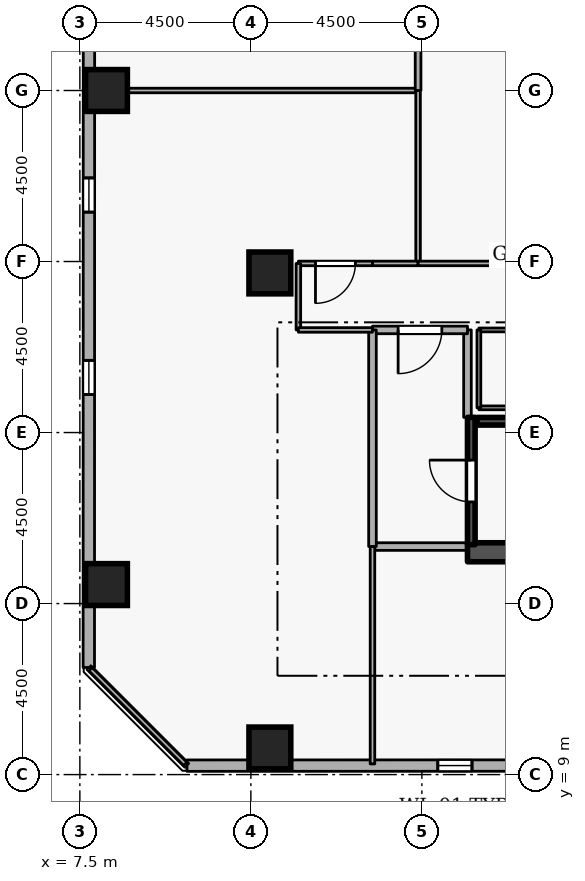
"""IFC4 building model, lengths in metres.
Left out: names, types, materials, properties, quantities, classifications, styles, units other than length and angle.
Written with IfcOpenShell. Run it as: python <this file> out.ifc"""

import sys

from ifc_helpers import new_model, si_unit, direction, frame, frame_2d, origin, origin_2d, place, context, subcontext, project, spatial, rectangle, extrude, element, fill, save


model = new_model("IFC4")
c1 = context("Model", 3, precision=1e-05, world=origin(), true_north=direction((0.0, 1.0)))
c2 = subcontext(c1, "Body", "Model", "MODEL_VIEW")
j1 = project(units=[si_unit("LENGTHUNIT", "METRE"), si_unit("PLANEANGLEUNIT", "RADIAN")], contexts=[c1])
p1 = place(None, origin())
s1 = spatial("IfcSite", under=j1, at=p1, CompositionType="ELEMENT")
p2 = place(p1, origin())
s2 = spatial("IfcBuilding", under=s1, at=p2, CompositionType="ELEMENT")
p3 = place(p2, frame((0.0, 0.0, 189.3)))
s3 = spatial("IfcBuildingStorey", under=s2, at=p3, CompositionType="ELEMENT", Elevation=189.3)
p4 = place(p3, frame((17.7, 14.85, 0.0), z_axis=(0.0, 0.0, 1.0), x_axis=(1.0, 0.0, 0.0)))
e1 = element("IfcWall", 1, at=p4, inside=s3, PredefinedType="SHEAR", context=c2, shape_type="SweptSolid", body=[
    extrude(rectangle(XDim=15.6, YDim=0.5, at=frame_2d((7.8, 0.0))), origin(), (0.0, 0.0, 1.0), 3.6),
])
for number, where, z_axis, x_axis in (
    (2, (12.5, 9.7, 0.0), (0.0, 0.0, 1.0), (1.0, 0.0, 0.0)),
    (3, (8.2, 14.0, 0.0), (0.0, 0.0, 1.0), (1.0, 0.0, 0.0)),
    (4, (8.2, 27.0, 0.0), (0.0, 0.0, 1.0), (1.0, 0.0, 0.0)),
    (5, (12.5, 22.2, 0.0), (0.0, 0.0, 1.0), (1.0, 0.0, 0.0)),
):
    element("IfcColumn", number, at=place(p3, frame(where, z_axis=z_axis, x_axis=x_axis)), inside=s3, PredefinedType="COLUMN", context=c2, shape_type="SweptSolid", body=[
        extrude(rectangle(XDim=1.1, YDim=1.1, at=origin_2d()), origin(), (0.0, 0.0, 1.0), 3.6),
    ])
p5 = place(p3, frame((10.319, 9.235, 0.0), z_axis=(0.0, 0.0, 1.0), x_axis=(0.999999969988, 0.000244999128, 0.0)))
e6 = element("IfcWall", 6, at=p5, inside=s3, PredefinedType="STANDARD", context=c2, shape_type="SweptSolid", body=[
    extrude(rectangle(XDim=33.881, YDim=0.3, at=frame_2d((16.94, 0.0))), origin(), (0.0, 0.0, 1.0), 2.7),
])
p6 = place(p5, frame((6.6, 0.0, 0.72)))
e7 = element("IfcOpeningElement", 7, at=p6, cuts=e6, PredefinedType="OPENING", context=c2, shape_type="SweptSolid", body=[
    extrude(rectangle(XDim=0.9, YDim=1.75, at=frame_2d((0.45, 0.875))), frame((0.0, 0.16, 0.0), z_axis=(0.0, -1.0, 0.0), x_axis=(1.0, 0.0, 0.0)), (0.0, 0.0, 1.0), 0.32),
])
p7 = place(p5, frame((11.4, 0.0, 0.72)))
e8 = element("IfcOpeningElement", 8, at=p7, cuts=e6, PredefinedType="OPENING", context=c2, shape_type="SweptSolid", body=[
    extrude(rectangle(XDim=0.9, YDim=1.75, at=frame_2d((0.45, 0.875))), frame((0.0, 0.16, 0.0), z_axis=(0.0, -1.0, 0.0), x_axis=(1.0, 0.0, 0.0)), (0.0, 0.0, 1.0), 0.32),
])
p8 = place(p5, frame((21.0, 0.0, 0.72)))
e9 = element("IfcOpeningElement", 9, at=p8, cuts=e6, PredefinedType="OPENING", context=c2, shape_type="SweptSolid", body=[
    extrude(rectangle(XDim=0.9, YDim=1.75, at=frame_2d((0.45, 0.875))), frame((0.0, 0.16, 0.0), z_axis=(0.0, -1.0, 0.0), x_axis=(1.0, 0.0, 0.0)), (0.0, 0.0, 1.0), 0.32),
])
p9 = place(p5, frame((25.8, 0.0, 0.72)))
e10 = element("IfcOpeningElement", 10, at=p9, cuts=e6, PredefinedType="OPENING", context=c2, shape_type="SweptSolid", body=[
    extrude(rectangle(XDim=0.9, YDim=1.75, at=frame_2d((0.45, 0.875))), frame((0.0, 0.16, 0.0), z_axis=(0.0, -1.0, 0.0), x_axis=(1.0, 0.0, 0.0)), (0.0, 0.0, 1.0), 0.32),
])
p10 = place(p5, frame((30.6, 0.0, 0.72)))
e11 = element("IfcOpeningElement", 11, at=p10, cuts=e6, PredefinedType="OPENING", context=c2, shape_type="SweptSolid", body=[
    extrude(rectangle(XDim=0.9, YDim=1.75, at=frame_2d((0.45, 0.875))), frame((0.0, 0.16, 0.0), z_axis=(0.0, -1.0, 0.0), x_axis=(1.0, 0.0, 0.0)), (0.0, 0.0, 1.0), 0.32),
])
p11 = place(p3, frame((7.744, 45.699, 0.0), z_axis=(0.0, 0.0, 1.0), x_axis=(-0.000244999128, -0.999999969988, 0.0)))
e12 = element("IfcWall", 12, at=p11, inside=s3, PredefinedType="STANDARD", context=c2, shape_type="SweptSolid", body=[
    extrude(rectangle(XDim=33.881, YDim=0.3, at=frame_2d((16.94, 0.0))), origin(), (0.0, 0.0, 1.0), 2.7),
])
p12 = place(p11, frame((1.8, 0.0, 0.72)))
e13 = element("IfcOpeningElement", 13, at=p12, cuts=e12, PredefinedType="OPENING", context=c2, shape_type="SweptSolid", body=[
    extrude(rectangle(XDim=0.9, YDim=1.75, at=frame_2d((0.45, 0.875))), frame((0.0, 0.16, 0.0), z_axis=(0.0, -1.0, 0.0), x_axis=(1.0, 0.0, 0.0)), (0.0, 0.0, 1.0), 0.32),
])
p13 = place(p11, frame((11.4, 0.0, 0.72)))
e14 = element("IfcOpeningElement", 14, at=p13, cuts=e12, PredefinedType="OPENING", context=c2, shape_type="SweptSolid", body=[
    extrude(rectangle(XDim=0.9, YDim=1.75, at=frame_2d((0.45, 0.875))), frame((0.0, 0.16, 0.0), z_axis=(0.0, -1.0, 0.0), x_axis=(1.0, 0.0, 0.0)), (0.0, 0.0, 1.0), 0.32),
])
p14 = place(p11, frame((16.2, 0.0, 0.72)))
e15 = element("IfcOpeningElement", 15, at=p14, cuts=e12, PredefinedType="OPENING", context=c2, shape_type="SweptSolid", body=[
    extrude(rectangle(XDim=0.9, YDim=1.75, at=frame_2d((0.45, 0.875))), frame((0.0, 0.16, 0.0), z_axis=(0.0, -1.0, 0.0), x_axis=(1.0, 0.0, 0.0)), (0.0, 0.0, 1.0), 0.32),
])
p15 = place(p11, frame((21.0, 0.0, 0.72)))
e16 = element("IfcOpeningElement", 16, at=p15, cuts=e12, PredefinedType="OPENING", context=c2, shape_type="SweptSolid", body=[
    extrude(rectangle(XDim=0.9, YDim=1.75, at=frame_2d((0.45, 0.875))), frame((0.0, 0.16, 0.0), z_axis=(0.0, -1.0, 0.0), x_axis=(1.0, 0.0, 0.0)), (0.0, 0.0, 1.0), 0.32),
])
p16 = place(p11, frame((25.8, 0.0, 0.72)))
e17 = element("IfcOpeningElement", 17, at=p16, cuts=e12, PredefinedType="OPENING", context=c2, shape_type="SweptSolid", body=[
    extrude(rectangle(XDim=0.9, YDim=1.75, at=frame_2d((0.45, 0.875))), frame((0.0, 0.16, 0.0), z_axis=(0.0, -1.0, 0.0), x_axis=(1.0, 0.0, 0.0)), (0.0, 0.0, 1.0), 0.32),
])
p17 = place(p3, frame((17.8, 15.05, 0.0), z_axis=(0.0, 0.0, 1.0), x_axis=(0.0, 1.0, 0.0)))
e18 = element("IfcWall", 18, at=p17, inside=s3, PredefinedType="SHEAR", context=c2, shape_type="SweptSolid", body=[
    extrude(rectangle(XDim=3.35, YDim=0.2, at=frame_2d((1.675, 0.0))), origin(), (0.0, 0.0, 1.0), 3.6),
])
p18 = place(p17, frame((1.125, 0.0, 0.0)))
e19 = element("IfcOpeningElement", 19, at=p18, cuts=e18, PredefinedType="OPENING", context=c2, shape_type="SweptSolid", body=[
    extrude(rectangle(XDim=1.1, YDim=2.1, at=frame_2d((0.55, 1.05))), frame((0.0, 0.11, 0.0), z_axis=(0.0, -1.0, 0.0), x_axis=(1.0, 0.0, 0.0)), (0.0, 0.0, 1.0), 0.22),
])
p19 = place(p3, frame((25.05, 18.297, 0.0), z_axis=(0.0, 0.0, 1.0), x_axis=(-1.0, 0.0, 0.0)))
e20 = element("IfcWall", 20, at=p19, inside=s3, PredefinedType="SHEAR", context=c2, shape_type="SweptSolid", body=[
    extrude(rectangle(XDim=7.1, YDim=0.2, at=frame_2d((3.55, 0.0))), origin(), (0.0, 0.0, 1.0), 3.6),
])
p20 = place(p3, frame((15.2, 15.0, 0.0), z_axis=(0.0, 0.0, 1.0), x_axis=(1.0, 0.0, 0.0)))
e21 = element("IfcWall", 21, at=p20, inside=s3, PredefinedType="STANDARD", context=c2, shape_type="SweptSolid", body=[
    extrude(rectangle(XDim=2.5, YDim=0.2, at=frame_2d((1.25, 0.0))), origin(), (0.0, 0.0, 1.0), 3.34),
])
p21 = place(p3, frame((17.7, 18.4, 0.0), z_axis=(0.0, 0.0, 1.0), x_axis=(0.0, 1.0, 0.0)))
e22 = element("IfcWall", 22, at=p21, inside=s3, PredefinedType="STANDARD", context=c2, shape_type="SweptSolid", body=[
    extrude(rectangle(XDim=2.3, YDim=0.2, at=frame_2d((1.15, 0.0))), origin(), (0.0, 0.0, 1.0), 2.545),
])
p22 = place(p3, frame((17.7, 20.7, 0.0), z_axis=(0.0, 0.0, 1.0), x_axis=(-1.0, 0.0, 0.0)))
e23 = element("IfcWall", 23, at=p22, inside=s3, PredefinedType="STANDARD", context=c2, shape_type="SweptSolid", body=[
    extrude(rectangle(XDim=2.5, YDim=0.2, at=frame_2d((1.25, 0.0))), origin(), (0.0, 0.0, 1.0), 3.34),
])
p23 = place(p22, frame((0.675, 0.0, 0.0)))
e24 = element("IfcOpeningElement", 24, at=p23, cuts=e23, PredefinedType="OPENING", context=c2, shape_type="SweptSolid", body=[
    extrude(rectangle(XDim=1.15, YDim=2.1, at=frame_2d((0.575, 1.05))), frame((0.0, 0.11, 0.0), z_axis=(0.0, -1.0, 0.0), x_axis=(1.0, 0.0, 0.0)), (0.0, 0.0, 1.0), 0.22),
])
p24 = place(p3, frame((15.2, 20.7, 0.0), z_axis=(0.0, 0.0, 1.0), x_axis=(0.0, -1.0, 0.0)))
e25 = element("IfcWall", 25, at=p24, inside=s3, PredefinedType="STANDARD", context=c2, shape_type="SweptSolid", body=[
    extrude(rectangle(XDim=5.7, YDim=0.2, at=frame_2d((2.85, 0.0))), origin(), (0.0, 0.0, 1.0), 3.34),
])
p25 = place(p3, frame((18.0, 18.65, 0.0), z_axis=(0.0, 0.0, 1.0), x_axis=(1.0, 0.0, 0.0)))
e26 = element("IfcWall", 26, at=p25, inside=s3, PredefinedType="PARTITIONING", context=c2, shape_type="SweptSolid", body=[
    extrude(rectangle(XDim=2.6, YDim=0.1, at=frame_2d((1.3, 0.0))), origin(), (0.0, 0.0, 1.0), 3.34),
])
p26 = place(p3, frame((20.6, 20.7, 0.0), z_axis=(0.0, 0.0, 1.0), x_axis=(-1.0, 0.0, 0.0)))
e27 = element("IfcWall", 27, at=p26, inside=s3, PredefinedType="PARTITIONING", context=c2, shape_type="SweptSolid", body=[
    extrude(rectangle(XDim=2.6, YDim=0.1, at=frame_2d((1.3, 0.0))), origin(), (0.0, 0.0, 1.0), 3.34),
])
p27 = place(p26, frame((0.825, 0.0, 0.0)))
e28 = element("IfcOpeningElement", 28, at=p27, cuts=e27, PredefinedType="OPENING", context=c2, shape_type="SweptSolid", body=[
    extrude(rectangle(XDim=0.95, YDim=2.1, at=frame_2d((0.475, 1.05))), frame((0.0, 0.06, 0.0), z_axis=(0.0, -1.0, 0.0), x_axis=(1.0, 0.0, 0.0)), (0.0, 0.0, 1.0), 0.12),
])
p28 = place(p3, frame((18.0, 20.7, 0.0), z_axis=(0.0, 0.0, 1.0), x_axis=(0.0, -1.0, 0.0)))
e29 = element("IfcWall", 29, at=p28, inside=s3, PredefinedType="PARTITIONING", context=c2, shape_type="SweptSolid", body=[
    extrude(rectangle(XDim=2.05, YDim=0.1, at=frame_2d((1.025, 0.0))), origin(), (0.0, 0.0, 1.0), 2.545),
])
p29 = place(p3, frame((7.78, 27.0, 0.0), z_axis=(0.0, 0.0, 1.0), x_axis=(1.0, 0.0, 0.0)))
e30 = element("IfcWall", 30, at=p29, inside=s3, PredefinedType="PARTITIONING", context=c2, shape_type="SweptSolid", body=[
    extrude(rectangle(XDim=8.62, YDim=0.12, at=frame_2d((4.31, 0.0))), origin(), (0.0, 0.0, 1.0), 2.878),
])
p30 = place(p3, frame((16.4, 27.0, 0.0), z_axis=(0.0, 0.0, 1.0), x_axis=(0.0, -1.0, 0.0)))
e31 = element("IfcWall", 31, at=p30, inside=s3, PredefinedType="PARTITIONING", context=c2, shape_type="SweptSolid", body=[
    extrude(rectangle(XDim=4.55, YDim=0.12, at=frame_2d((2.275, 0.0))), origin(), (0.0, 0.0, 1.0), 3.34),
])
p31 = place(p3, frame((16.4, 22.45, 0.0), z_axis=(0.0, 0.0, 1.0), x_axis=(-1.0, 0.0, 0.0)))
e32 = element("IfcWall", 32, at=p31, inside=s3, PredefinedType="PARTITIONING", context=c2, shape_type="SweptSolid", body=[
    extrude(rectangle(XDim=1.2, YDim=0.12, at=frame_2d((0.6, 0.0))), origin(), (0.0, 0.0, 1.0), 3.34),
])
p32 = place(p3, frame((15.2, 22.45, 0.0), z_axis=(0.0, 0.0, 1.0), x_axis=(-1.0, 0.0, 0.0)))
e33 = element("IfcWall", 33, at=p32, inside=s3, PredefinedType="PARTITIONING", context=c2, shape_type="SweptSolid", body=[
    extrude(rectangle(XDim=1.95, YDim=0.12, at=frame_2d((0.975, 0.0))), origin(), (0.0, 0.0, 1.0), 3.34),
])
p33 = place(p32, frame((0.45, 0.0, 0.0)))
e34 = element("IfcOpeningElement", 34, at=p33, cuts=e33, PredefinedType="OPENING", context=c2, shape_type="SweptSolid", body=[
    extrude(rectangle(XDim=1.05, YDim=2.1, at=frame_2d((0.525, 1.05))), frame((0.0, 0.07, 0.0), z_axis=(0.0, -1.0, 0.0), x_axis=(1.0, 0.0, 0.0)), (0.0, 0.0, 1.0), 0.14),
])
p34 = place(p3, frame((13.25, 22.45, 0.0), z_axis=(0.0, 0.0, 1.0), x_axis=(0.0, -1.0, 0.0)))
e35 = element("IfcWall", 35, at=p34, inside=s3, PredefinedType="PARTITIONING", context=c2, shape_type="SweptSolid", body=[
    extrude(rectangle(XDim=1.75, YDim=0.12, at=frame_2d((0.875, 0.0))), origin(), (0.0, 0.0, 1.0), 3.34),
])
p35 = place(p3, frame((13.25, 20.7, 0.0), z_axis=(0.0, 0.0, 1.0), x_axis=(1.0, 0.0, 0.0)))
e36 = element("IfcWall", 36, at=p35, inside=s3, PredefinedType="PARTITIONING", context=c2, shape_type="SweptSolid", body=[
    extrude(rectangle(XDim=1.95, YDim=0.12, at=frame_2d((0.975, 0.0))), origin(), (0.0, 0.0, 1.0), 3.34),
])
p36 = place(p3, frame((15.2, 15.0, 0.0), z_axis=(0.0, 0.0, 1.0), x_axis=(0.0, -1.0, 0.0)))
e37 = element("IfcWall", 37, at=p36, inside=s3, PredefinedType="PARTITIONING", context=c2, shape_type="SweptSolid", body=[
    extrude(rectangle(XDim=5.72, YDim=0.12, at=frame_2d((2.86, 0.0))), origin(), (0.0, 0.0, 1.0), 3.34),
])
p37 = place(p3, frame((10.275, 9.28, 0.0), z_axis=(0.0, 0.0, 1.0), x_axis=(-0.707106781187, 0.707106781187, 0.0)))
e38 = element("IfcWall", 38, at=p37, inside=s3, PredefinedType="PARTITIONING", context=c2, shape_type="SweptSolid", body=[
    extrude(rectangle(XDim=3.528, YDim=0.12, at=frame_2d((1.764, 0.0))), origin(), (0.0, 0.0, 1.0), 3.34),
])
p38 = place(p3, frame((16.4, 31.55, 0.0), z_axis=(0.0, 0.0, 1.0), x_axis=(0.0, -1.0, 0.0)))
e39 = element("IfcWall", 39, at=p38, inside=s3, PredefinedType="PARTITIONING", context=c2, shape_type="SweptSolid", body=[
    extrude(rectangle(XDim=4.55, YDim=0.15, at=frame_2d((2.275, 0.0))), origin(), (0.0, 0.0, 1.0), 3.34),
])
p39 = place(p3, frame((20.9, 22.45, 0.0), z_axis=(0.0, 0.0, 1.0), x_axis=(-1.0, 0.0, 0.0)))
e40 = element("IfcWall", 40, at=p39, inside=s3, PredefinedType="PARTITIONING", context=c2, shape_type="SweptSolid", body=[
    extrude(rectangle(XDim=4.5, YDim=0.12, at=frame_2d((2.25, 0.0))), origin(), (0.0, 0.0, 1.0), 3.34),
])
p40 = place(p6, origin())
e41 = element("IfcWindow", 41, at=p40, inside=s3, PartitioningType="SINGLE_PANEL", PredefinedType="WINDOW", context=c2, shape_type="SweptSolid", body=[
    extrude(rectangle(XDim=0.9, YDim=1.75, at=frame_2d((0.45, 0.875))), frame((0.0, 0.03, 0.0), z_axis=(0.0, -1.0, 0.0), x_axis=(1.0, 0.0, 0.0)), (0.0, 0.0, 1.0), 0.06),
])
fill(e7, e41)
p41 = place(p15, origin())
e42 = element("IfcWindow", 42, at=p41, inside=s3, PartitioningType="SINGLE_PANEL", PredefinedType="WINDOW", context=c2, shape_type="SweptSolid", body=[
    extrude(rectangle(XDim=0.9, YDim=1.75, at=frame_2d((0.45, 0.875))), frame((0.0, 0.03, 0.0), z_axis=(0.0, -1.0, 0.0), x_axis=(1.0, 0.0, 0.0)), (0.0, 0.0, 1.0), 0.06),
])
fill(e16, e42)
p42 = place(p16, origin())
e43 = element("IfcWindow", 43, at=p42, inside=s3, PartitioningType="SINGLE_PANEL", PredefinedType="WINDOW", context=c2, shape_type="SweptSolid", body=[
    extrude(rectangle(XDim=0.9, YDim=1.75, at=frame_2d((0.45, 0.875))), frame((0.0, 0.03, 0.0), z_axis=(0.0, -1.0, 0.0), x_axis=(1.0, 0.0, 0.0)), (0.0, 0.0, 1.0), 0.06),
])
fill(e17, e43)
p43 = place(p18, origin())
e44 = element("IfcDoor", 44, at=p43, inside=s3, OperationType="SINGLE_SWING_RIGHT", PredefinedType="DOOR", context=c2, shape_type="SweptSolid", body=[
    extrude(rectangle(XDim=1.1, YDim=2.1, at=frame_2d((0.55, 1.05))), frame((0.0, 0.025, 0.0), z_axis=(0.0, -1.0, 0.0), x_axis=(1.0, 0.0, 0.0)), (0.0, 0.0, 1.0), 0.05),
])
fill(e19, e44)
p44 = place(p23, origin())
e45 = element("IfcDoor", 45, at=p44, inside=s3, OperationType="SINGLE_SWING_RIGHT", PredefinedType="DOOR", context=c2, shape_type="SweptSolid", body=[
    extrude(rectangle(XDim=1.15, YDim=2.1, at=frame_2d((0.575, 1.05))), frame((0.0, 0.025, 0.0), z_axis=(0.0, -1.0, 0.0), x_axis=(1.0, 0.0, 0.0)), (0.0, 0.0, 1.0), 0.05),
])
fill(e24, e45)
p45 = place(p33, origin())
e46 = element("IfcDoor", 46, at=p45, inside=s3, OperationType="SINGLE_SWING_RIGHT", PredefinedType="DOOR", context=c2, shape_type="SweptSolid", body=[
    extrude(rectangle(XDim=1.05, YDim=2.1, at=frame_2d((0.525, 1.05))), frame((0.0, 0.025, 0.0), z_axis=(0.0, -1.0, 0.0), x_axis=(1.0, 0.0, 0.0)), (0.0, 0.0, 1.0), 0.05),
])
fill(e34, e46)
save(model, sys.argv[1])
